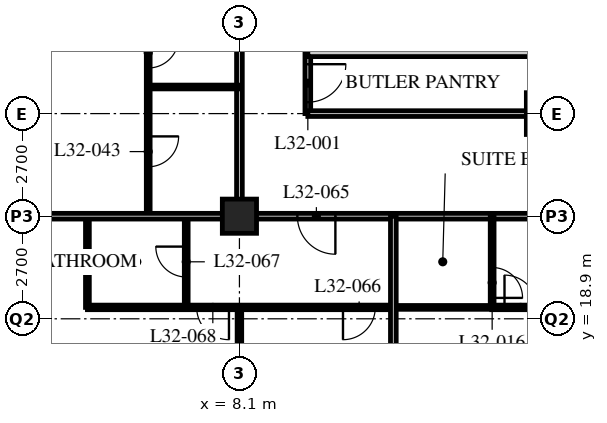
"""IFC4 building model, lengths in metres.
Left out: names, types, materials, properties, quantities, classifications, styles, units other than length and angle.
Written with IfcOpenShell. Run it as: python <this file> out.ifc"""

import sys

from ifc_helpers import new_model, si_unit, direction, frame, frame_2d, origin, origin_2d, place, context, subcontext, project, spatial, rectangle, hollow_rectangle, extrude, element, fill, save


model = new_model("IFC4")
c1 = context("Model", 3, precision=1e-05, world=origin(), true_north=direction((0.0, 1.0)))
c2 = subcontext(c1, "Body", "Model", "MODEL_VIEW")
j1 = project(units=[si_unit("LENGTHUNIT", "METRE"), si_unit("PLANEANGLEUNIT", "RADIAN")], contexts=[c1])
p1 = place(None, origin())
s1 = spatial("IfcSite", under=j1, at=p1, CompositionType="ELEMENT")
p2 = place(p1, origin())
s2 = spatial("IfcBuilding", under=s1, at=p2, CompositionType="ELEMENT")
p3 = place(p2, frame((0.0, 0.0, 127.2)))
s3 = spatial("IfcBuildingStorey", under=s2, at=p3, CompositionType="ELEMENT", Elevation=127.2)
p4 = place(p3, frame((8.1, 21.6, 0.0), z_axis=(0.0, 0.0, 1.0), x_axis=(1.0, 0.0, 0.0)))
e1 = element("IfcColumn", 1, at=p4, inside=s3, PredefinedType="COLUMN", context=c2, shape_type="SweptSolid", body=[
    extrude(hollow_rectangle(XDim=0.9, YDim=0.9, WallThickness=0.09, at=origin_2d()), origin(), (0.0, 0.0, 1.0), 3.4),
])
p5 = place(p3, frame((16.2, 24.3, 0.0), z_axis=(0.0, 0.0, 1.0), x_axis=(1.0, 0.0, 0.0)))
e2 = element("IfcColumn", 2, at=p5, inside=s3, PredefinedType="COLUMN", context=c2, shape_type="SweptSolid", body=[
    extrude(hollow_rectangle(XDim=1.1, YDim=1.1, WallThickness=0.1, at=origin_2d()), origin(), (0.0, 0.0, 1.0), 3.4),
])
p6 = place(p3, frame((8.1, 21.6, 0.0), z_axis=(0.0, 0.0, 1.0), x_axis=(1.0, 0.0, 0.0)))
e3 = element("IfcWall", 3, at=p6, inside=s3, PredefinedType="PARTITIONING", context=c2, shape_type="SweptSolid", body=[
    extrude(rectangle(XDim=40.5, YDim=0.15, at=frame_2d((20.25, 0.0))), origin(), (0.0, 0.0, 1.0), 2.578),
])
p7 = place(p6, frame((9.625, 0.0, 0.0)))
e4 = element("IfcOpeningElement", 4, at=p7, cuts=e3, PredefinedType="OPENING", context=c2, shape_type="SweptSolid", body=[
    extrude(rectangle(XDim=1.0, YDim=2.1, at=frame_2d((0.5, 1.05))), frame((0.0, 0.085, 0.0), z_axis=(0.0, -1.0, 0.0), x_axis=(1.0, 0.0, 0.0)), (0.0, 0.0, 1.0), 0.17),
])
p8 = place(p6, frame((21.775, 0.0, 0.0)))
e5 = element("IfcOpeningElement", 5, at=p8, cuts=e3, PredefinedType="OPENING", context=c2, shape_type="SweptSolid", body=[
    extrude(rectangle(XDim=1.0, YDim=2.1, at=frame_2d((0.5, 1.05))), frame((0.0, 0.085, 0.0), z_axis=(0.0, -1.0, 0.0), x_axis=(1.0, 0.0, 0.0)), (0.0, 0.0, 1.0), 0.17),
])
p9 = place(p6, frame((28.95, 0.0, 0.0)))
e6 = element("IfcOpeningElement", 6, at=p9, cuts=e3, PredefinedType="OPENING", context=c2, shape_type="SweptSolid", body=[
    extrude(rectangle(XDim=1.0, YDim=2.1, at=frame_2d((0.5, 1.05))), frame((0.0, 0.085, 0.0), z_axis=(0.0, -1.0, 0.0), x_axis=(1.0, 0.0, 0.0)), (0.0, 0.0, 1.0), 0.17),
])
p10 = place(p6, frame((34.85, 0.0, 0.0)))
e7 = element("IfcOpeningElement", 7, at=p10, cuts=e3, PredefinedType="OPENING", context=c2, shape_type="SweptSolid", body=[
    extrude(rectangle(XDim=1.0, YDim=2.1, at=frame_2d((0.5, 1.05))), frame((0.0, 0.085, 0.0), z_axis=(0.0, -1.0, 0.0), x_axis=(1.0, 0.0, 0.0)), (0.0, 0.0, 1.0), 0.17),
])
p11 = place(p6, frame((1.525, 0.0, 0.0)))
e8 = element("IfcOpeningElement", 8, at=p11, cuts=e3, PredefinedType="OPENING", context=c2, shape_type="SweptSolid", body=[
    extrude(rectangle(XDim=1.0, YDim=2.1, at=frame_2d((0.5, 1.05))), frame((0.0, 0.085, 0.0), z_axis=(0.0, -1.0, 0.0), x_axis=(1.0, 0.0, 0.0)), (0.0, 0.0, 1.0), 0.17),
])
p12 = place(p6, frame((37.975, 0.0, 0.0)))
e9 = element("IfcOpeningElement", 9, at=p12, cuts=e3, PredefinedType="OPENING", context=c2, shape_type="SweptSolid", body=[
    extrude(rectangle(XDim=1.0, YDim=2.1, at=frame_2d((0.5, 1.05))), frame((0.0, 0.085, 0.0), z_axis=(0.0, -1.0, 0.0), x_axis=(1.0, 0.0, 0.0)), (0.0, 0.0, 1.0), 0.17),
])
p13 = place(p3, frame((8.1, 21.6, 0.0), z_axis=(0.0, 0.0, 1.0), x_axis=(0.0, 1.0, 0.0)))
e10 = element("IfcWall", 10, at=p13, inside=s3, PredefinedType="PARTITIONING", context=c2, shape_type="SweptSolid", body=[
    extrude(rectangle(XDim=24.3, YDim=0.15, at=frame_2d((12.15, 0.0))), origin(), (0.0, 0.0, 1.0), 2.578),
])
p14 = place(p13, frame((5.45, 0.0, 0.0)))
e11 = element("IfcOpeningElement", 11, at=p14, cuts=e10, PredefinedType="OPENING", context=c2, shape_type="SweptSolid", body=[
    extrude(rectangle(XDim=1.0, YDim=2.1, at=frame_2d((0.5, 1.05))), frame((0.0, 0.085, 0.0), z_axis=(0.0, -1.0, 0.0), x_axis=(1.0, 0.0, 0.0)), (0.0, 0.0, 1.0), 0.17),
])
p15 = place(p13, frame((10.0, 0.0, 0.0)))
e12 = element("IfcOpeningElement", 12, at=p15, cuts=e10, PredefinedType="OPENING", context=c2, shape_type="SweptSolid", body=[
    extrude(rectangle(XDim=1.0, YDim=2.1, at=frame_2d((0.5, 1.05))), frame((0.0, 0.085, 0.0), z_axis=(0.0, -1.0, 0.0), x_axis=(1.0, 0.0, 0.0)), (0.0, 0.0, 1.0), 0.17),
])
p16 = place(p13, frame((21.65, 0.0, 0.0)))
e13 = element("IfcOpeningElement", 13, at=p16, cuts=e10, PredefinedType="OPENING", context=c2, shape_type="SweptSolid", body=[
    extrude(rectangle(XDim=1.0, YDim=2.1, at=frame_2d((0.5, 1.05))), frame((0.0, 0.085, 0.0), z_axis=(0.0, -1.0, 0.0), x_axis=(1.0, 0.0, 0.0)), (0.0, 0.0, 1.0), 0.17),
])
p17 = place(p3, frame((9.9, 44.1, 0.0), z_axis=(0.0, 0.0, 1.0), x_axis=(0.0, -1.0, 0.0)))
e14 = element("IfcWall", 14, at=p17, inside=s3, PredefinedType="PARTITIONING", context=c2, shape_type="SweptSolid", body=[
    extrude(rectangle(XDim=19.8, YDim=0.15, at=frame_2d((9.9, 0.0))), origin(), (0.0, 0.0, 1.0), 3.19),
])
p18 = place(p17, frame((18.5, 0.0, 0.0)))
e15 = element("IfcOpeningElement", 15, at=p18, cuts=e14, PredefinedType="OPENING", context=c2, shape_type="SweptSolid", body=[
    extrude(rectangle(XDim=1.0, YDim=2.1, at=frame_2d((0.5, 1.05))), frame((0.0, 0.085, 0.0), z_axis=(0.0, -1.0, 0.0), x_axis=(1.0, 0.0, 0.0)), (0.0, 0.0, 1.0), 0.17),
])
p19 = place(p17, frame((14.45, 0.0, 0.0)))
e16 = element("IfcOpeningElement", 16, at=p19, cuts=e14, PredefinedType="OPENING", context=c2, shape_type="SweptSolid", body=[
    extrude(rectangle(XDim=1.0, YDim=2.1, at=frame_2d((0.5, 1.05))), frame((0.0, 0.085, 0.0), z_axis=(0.0, -1.0, 0.0), x_axis=(1.0, 0.0, 0.0)), (0.0, 0.0, 1.0), 0.17),
])
p20 = place(p17, frame((7.15, 0.0, 0.0)))
e17 = element("IfcOpeningElement", 17, at=p20, cuts=e14, PredefinedType="OPENING", context=c2, shape_type="SweptSolid", body=[
    extrude(rectangle(XDim=1.0, YDim=2.1, at=frame_2d((0.5, 1.05))), frame((0.0, 0.085, 0.0), z_axis=(0.0, -1.0, 0.0), x_axis=(1.0, 0.0, 0.0)), (0.0, 0.0, 1.0), 0.17),
])
p21 = place(p3, frame((9.9, 24.3, 0.0), z_axis=(0.0, 0.0, 1.0), x_axis=(1.0, 0.0, 0.0)))
e18 = element("IfcWall", 18, at=p21, inside=s3, PredefinedType="PARTITIONING", context=c2, shape_type="SweptSolid", body=[
    extrude(rectangle(XDim=6.1, YDim=0.15, at=frame_2d((3.05, 0.0))), origin(), (0.0, 0.0, 1.0), 3.19),
])
p22 = place(p3, frame((9.9, 25.9, 0.0), z_axis=(0.0, 0.0, 1.0), x_axis=(1.0, 0.0, 0.0)))
e19 = element("IfcWall", 19, at=p22, inside=s3, PredefinedType="SOLIDWALL", context=c2, shape_type="SweptSolid", body=[
    extrude(rectangle(XDim=6.3, YDim=0.2, at=frame_2d((3.15, 0.0))), origin(), (0.0, 0.0, 1.0), 3.19),
])
p23 = place(p3, frame((12.15, 19.2, 0.0), z_axis=(0.0, 0.0, 1.0), x_axis=(1.0, 0.0, 0.0)))
e20 = element("IfcWall", 20, at=p23, inside=s3, PredefinedType="PARTITIONING", context=c2, shape_type="SweptSolid", body=[
    extrude(rectangle(XDim=2.6, YDim=0.1, at=frame_2d((1.3, 0.0))), origin(), (0.0, 0.0, 1.0), 3.19),
])
p24 = place(p3, frame((14.75, 21.6, 0.0), z_axis=(0.0, 0.0, 1.0), x_axis=(0.0, -1.0, 0.0)))
e21 = element("IfcWall", 21, at=p24, inside=s3, PredefinedType="PARTITIONING", context=c2, shape_type="SweptSolid", body=[
    extrude(rectangle(XDim=2.4, YDim=0.1, at=frame_2d((1.2, 0.0))), origin(), (0.0, 0.0, 1.0), 3.19),
])
p25 = place(p24, frame((1.35, 0.0, 0.0)))
e22 = element("IfcOpeningElement", 22, at=p25, cuts=e21, PredefinedType="OPENING", context=c2, shape_type="SweptSolid", body=[
    extrude(rectangle(XDim=0.8, YDim=2.1, at=frame_2d((0.4, 1.05))), frame((0.0, 0.06, 0.0), z_axis=(0.0, -1.0, 0.0), x_axis=(1.0, 0.0, 0.0)), (0.0, 0.0, 1.0), 0.12),
])
p26 = place(p3, frame((5.7, 21.6, 0.0), z_axis=(0.0, 0.0, 1.0), x_axis=(0.0, 1.0, 0.0)))
e23 = element("IfcWall", 23, at=p26, inside=s3, PredefinedType="PARTITIONING", context=c2, shape_type="SweptSolid", body=[
    extrude(rectangle(XDim=5.2, YDim=0.1, at=frame_2d((2.6, 0.0))), origin(), (0.0, 0.0, 1.0), 3.19),
])
p27 = place(p26, frame((1.3, 0.0, 0.0)))
e24 = element("IfcOpeningElement", 24, at=p27, cuts=e23, PredefinedType="OPENING", context=c2, shape_type="SweptSolid", body=[
    extrude(rectangle(XDim=0.8, YDim=2.1, at=frame_2d((0.4, 1.05))), frame((0.0, 0.06, 0.0), z_axis=(0.0, -1.0, 0.0), x_axis=(1.0, 0.0, 0.0)), (0.0, 0.0, 1.0), 0.12),
])
p28 = place(p26, frame((3.9, 0.0, 0.0)))
e25 = element("IfcOpeningElement", 25, at=p28, cuts=e23, PredefinedType="OPENING", context=c2, shape_type="SweptSolid", body=[
    extrude(rectangle(XDim=0.8, YDim=2.1, at=frame_2d((0.4, 1.05))), frame((0.0, 0.06, 0.0), z_axis=(0.0, -1.0, 0.0), x_axis=(1.0, 0.0, 0.0)), (0.0, 0.0, 1.0), 0.12),
])
p29 = place(p3, frame((8.1, 25.0, 0.0), z_axis=(0.0, 0.0, 1.0), x_axis=(-1.0, 0.0, 0.0)))
e26 = element("IfcWall", 26, at=p29, inside=s3, PredefinedType="PARTITIONING", context=c2, shape_type="SweptSolid", body=[
    extrude(rectangle(XDim=2.4, YDim=0.1, at=frame_2d((1.2, 0.0))), origin(), (0.0, 0.0, 1.0), 3.19),
])
p30 = place(p3, frame((6.7, 21.6, 0.0), z_axis=(0.0, 0.0, 1.0), x_axis=(0.0, -1.0, 0.0)))
e27 = element("IfcWall", 27, at=p30, inside=s3, PredefinedType="PARTITIONING", context=c2, shape_type="SweptSolid", body=[
    extrude(rectangle(XDim=2.4, YDim=0.1, at=frame_2d((1.2, 0.0))), origin(), (0.0, 0.0, 1.0), 3.19),
])
p31 = place(p30, frame((0.8, 0.0, 0.0)))
e28 = element("IfcOpeningElement", 28, at=p31, cuts=e27, PredefinedType="OPENING", context=c2, shape_type="SweptSolid", body=[
    extrude(rectangle(XDim=0.8, YDim=2.1, at=frame_2d((0.4, 1.05))), frame((0.0, 0.06, 0.0), z_axis=(0.0, -1.0, 0.0), x_axis=(1.0, 0.0, 0.0)), (0.0, 0.0, 1.0), 0.12),
])
p32 = place(p3, frame((4.1, 21.6, 0.0), z_axis=(0.0, 0.0, 1.0), x_axis=(0.0, -1.0, 0.0)))
e29 = element("IfcWall", 29, at=p32, inside=s3, PredefinedType="PARTITIONING", context=c2, shape_type="SweptSolid", body=[
    extrude(rectangle(XDim=2.4, YDim=0.1, at=frame_2d((1.2, 0.0))), origin(), (0.0, 0.0, 1.0), 3.19),
])
p33 = place(p3, frame((4.1, 19.2, 0.0), z_axis=(0.0, 0.0, 1.0), x_axis=(1.0, 0.0, 0.0)))
e30 = element("IfcWall", 30, at=p33, inside=s3, PredefinedType="PARTITIONING", context=c2, shape_type="SweptSolid", body=[
    extrude(rectangle(XDim=8.05, YDim=0.12, at=frame_2d((4.025, 0.0))), origin(), (0.0, 0.0, 1.0), 3.19),
])
p34 = place(p33, frame((6.725, 0.0, 0.0)))
e31 = element("IfcOpeningElement", 31, at=p34, cuts=e30, PredefinedType="OPENING", context=c2, shape_type="SweptSolid", body=[
    extrude(rectangle(XDim=0.85, YDim=2.1, at=frame_2d((0.425, 1.05))), frame((0.0, 0.07, 0.0), z_axis=(0.0, -1.0, 0.0), x_axis=(1.0, 0.0, 0.0)), (0.0, 0.0, 1.0), 0.14),
])
p35 = place(p33, frame((2.875, 0.0, 0.0)))
e32 = element("IfcOpeningElement", 32, at=p35, cuts=e30, PredefinedType="OPENING", context=c2, shape_type="SweptSolid", body=[
    extrude(rectangle(XDim=0.85, YDim=2.1, at=frame_2d((0.425, 1.05))), frame((0.0, 0.07, 0.0), z_axis=(0.0, -1.0, 0.0), x_axis=(1.0, 0.0, 0.0)), (0.0, 0.0, 1.0), 0.14),
])
p36 = place(p3, frame((8.1, 19.2, 0.0), z_axis=(0.0, 0.0, 1.0), x_axis=(0.0, -1.0, 0.0)))
e33 = element("IfcWall", 33, at=p36, inside=s3, PredefinedType="PARTITIONING", context=c2, shape_type="SweptSolid", body=[
    extrude(rectangle(XDim=9.45, YDim=0.12, at=frame_2d((4.725, 0.0))), origin(), (0.0, 0.0, 1.0), 2.578),
])
p37 = place(p3, frame((0.3, 21.6, 0.0), z_axis=(0.0, 0.0, 1.0), x_axis=(1.0, 0.0, 0.0)))
e34 = element("IfcWall", 34, at=p37, inside=s3, PredefinedType="PARTITIONING", context=c2, shape_type="SweptSolid", body=[
    extrude(rectangle(XDim=7.8, YDim=0.15, at=frame_2d((3.9, 0.0))), origin(), (0.0, 0.0, 1.0), 2.578),
])
p38 = place(p3, frame((12.15, 21.6, 0.0), z_axis=(0.0, 0.0, 1.0), x_axis=(0.0, -1.0, 0.0)))
e35 = element("IfcWall", 35, at=p38, inside=s3, PredefinedType="PARTITIONING", context=c2, shape_type="SweptSolid", body=[
    extrude(rectangle(XDim=15.9, YDim=0.15, at=frame_2d((7.95, 0.0))), origin(), (0.0, 0.0, 1.0), 3.19),
])
p39 = place(p3, frame((16.2, 19.2, 0.0), z_axis=(0.0, 0.0, 1.0), x_axis=(-1.0, 0.0, 0.0)))
e36 = element("IfcWall", 36, at=p39, inside=s3, PredefinedType="PARTITIONING", context=c2, shape_type="SweptSolid", body=[
    extrude(rectangle(XDim=1.46, YDim=0.12, at=frame_2d((0.73, 0.0))), origin(), (0.0, 0.0, 1.0), 3.19),
])
p40 = place(p39, frame((0.275, 0.0, 0.0)))
e37 = element("IfcOpeningElement", 37, at=p40, cuts=e36, PredefinedType="OPENING", context=c2, shape_type="SweptSolid", body=[
    extrude(rectangle(XDim=0.85, YDim=2.1, at=frame_2d((0.425, 1.05))), frame((0.0, 0.07, 0.0), z_axis=(0.0, -1.0, 0.0), x_axis=(1.0, 0.0, 0.0)), (0.0, 0.0, 1.0), 0.14),
])
p41 = place(p18, origin())
e38 = element("IfcDoor", 38, at=p41, inside=s3, OperationType="SINGLE_SWING_LEFT", PredefinedType="DOOR", context=c2, shape_type="SweptSolid", body=[
    extrude(rectangle(XDim=1.0, YDim=2.1, at=frame_2d((0.5, 1.05))), frame((0.0, 0.025, 0.0), z_axis=(0.0, -1.0, 0.0), x_axis=(1.0, 0.0, 0.0)), (0.0, 0.0, 1.0), 0.05),
])
fill(e15, e38)
p42 = place(p25, origin())
e39 = element("IfcDoor", 39, at=p42, inside=s3, OperationType="SINGLE_SWING_RIGHT", PredefinedType="DOOR", context=c2, shape_type="SweptSolid", body=[
    extrude(rectangle(XDim=0.8, YDim=2.1, at=frame_2d((0.4, 1.05))), frame((0.0, 0.025, 0.0), z_axis=(0.0, -1.0, 0.0), x_axis=(1.0, 0.0, 0.0)), (0.0, 0.0, 1.0), 0.05),
])
fill(e22, e39)
p43 = place(p27, origin())
e40 = element("IfcDoor", 40, at=p43, inside=s3, OperationType="SINGLE_SWING_LEFT", PredefinedType="DOOR", context=c2, shape_type="SweptSolid", body=[
    extrude(rectangle(XDim=0.8, YDim=2.1, at=frame_2d((0.4, 1.05))), frame((0.0, 0.025, 0.0), z_axis=(0.0, -1.0, 0.0), x_axis=(1.0, 0.0, 0.0)), (0.0, 0.0, 1.0), 0.05),
])
fill(e24, e40)
p44 = place(p28, origin())
e41 = element("IfcDoor", 41, at=p44, inside=s3, OperationType="SINGLE_SWING_LEFT", PredefinedType="DOOR", context=c2, shape_type="SweptSolid", body=[
    extrude(rectangle(XDim=0.8, YDim=2.1, at=frame_2d((0.4, 1.05))), frame((0.0, 0.025, 0.0), z_axis=(0.0, -1.0, 0.0), x_axis=(1.0, 0.0, 0.0)), (0.0, 0.0, 1.0), 0.05),
])
fill(e25, e41)
p45 = place(p11, origin())
e42 = element("IfcDoor", 42, at=p45, inside=s3, OperationType="SINGLE_SWING_LEFT", PredefinedType="DOOR", context=c2, shape_type="SweptSolid", body=[
    extrude(rectangle(XDim=1.0, YDim=2.1, at=frame_2d((0.5, 1.05))), frame((0.0, 0.025, 0.0), z_axis=(0.0, -1.0, 0.0), x_axis=(1.0, 0.0, 0.0)), (0.0, 0.0, 1.0), 0.05),
])
fill(e8, e42)
p46 = place(p34, origin())
e43 = element("IfcDoor", 43, at=p46, inside=s3, OperationType="SINGLE_SWING_RIGHT", PredefinedType="DOOR", context=c2, shape_type="SweptSolid", body=[
    extrude(rectangle(XDim=0.85, YDim=2.1, at=frame_2d((0.425, 1.05))), frame((0.0, 0.025, 0.0), z_axis=(0.0, -1.0, 0.0), x_axis=(1.0, 0.0, 0.0)), (0.0, 0.0, 1.0), 0.05),
])
fill(e31, e43)
p47 = place(p31, origin())
e44 = element("IfcDoor", 44, at=p47, inside=s3, OperationType="SINGLE_SWING_RIGHT", PredefinedType="DOOR", context=c2, shape_type="SweptSolid", body=[
    extrude(rectangle(XDim=0.8, YDim=2.1, at=frame_2d((0.4, 1.05))), frame((0.0, 0.025, 0.0), z_axis=(0.0, -1.0, 0.0), x_axis=(1.0, 0.0, 0.0)), (0.0, 0.0, 1.0), 0.05),
])
fill(e28, e44)
p48 = place(p35, origin())
e45 = element("IfcDoor", 45, at=p48, inside=s3, OperationType="SINGLE_SWING_LEFT", PredefinedType="DOOR", context=c2, shape_type="SweptSolid", body=[
    extrude(rectangle(XDim=0.85, YDim=2.1, at=frame_2d((0.425, 1.05))), frame((0.0, 0.025, 0.0), z_axis=(0.0, -1.0, 0.0), x_axis=(1.0, 0.0, 0.0)), (0.0, 0.0, 1.0), 0.05),
])
fill(e32, e45)
p49 = place(p40, origin())
e46 = element("IfcDoor", 46, at=p49, inside=s3, OperationType="SINGLE_SWING_LEFT", PredefinedType="DOOR", context=c2, shape_type="SweptSolid", body=[
    extrude(rectangle(XDim=0.85, YDim=2.1, at=frame_2d((0.425, 1.05))), frame((0.0, 0.025, 0.0), z_axis=(0.0, -1.0, 0.0), x_axis=(1.0, 0.0, 0.0)), (0.0, 0.0, 1.0), 0.05),
])
fill(e37, e46)
save(model, sys.argv[1])
